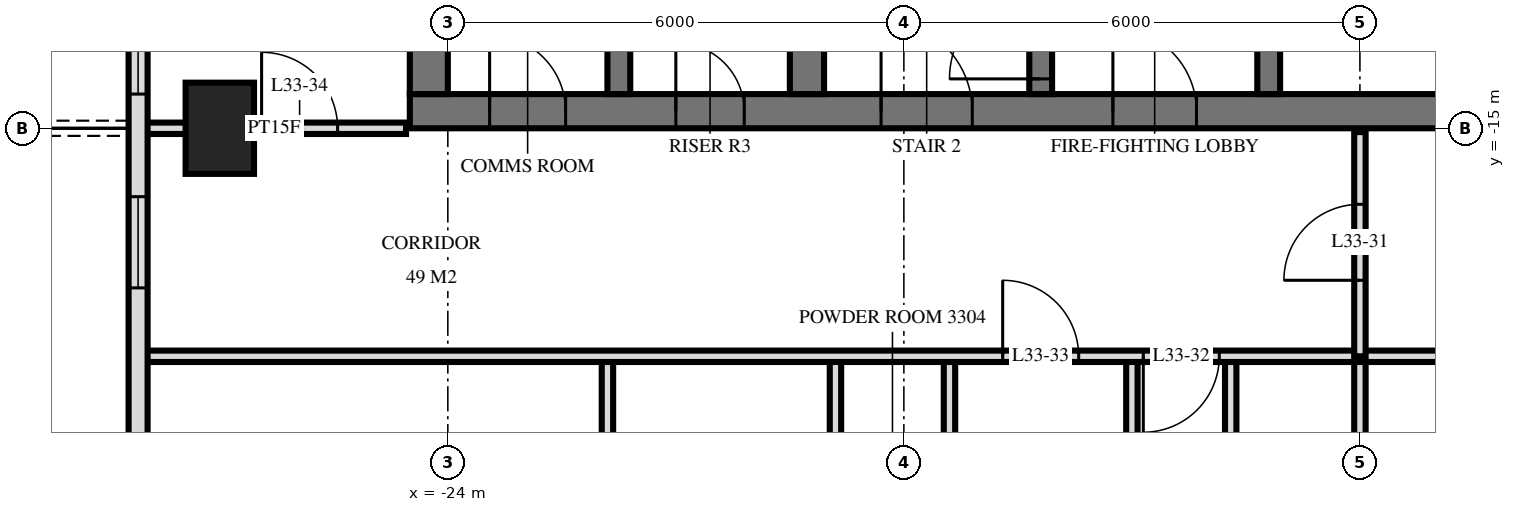
"""IFC4 building model, lengths in metres.
Left out: names, types, materials, properties, quantities, classifications, styles, units other than length and angle.
Written with IfcOpenShell. Run it as: python <this file> out.ifc"""

import sys

from ifc_helpers import new_model, si_unit, direction, frame, frame_2d, origin, origin_2d, place, context, subcontext, project, spatial, rectangle, extrude, element, fill, save


model = new_model("IFC4")
c1 = context("Model", 3, precision=1e-05, world=origin(), true_north=direction((0.0, 1.0)))
c2 = subcontext(c1, "Body", "Model", "MODEL_VIEW")
j1 = project(units=[si_unit("LENGTHUNIT", "METRE"), si_unit("PLANEANGLEUNIT", "RADIAN")], contexts=[c1])
p1 = place(None, origin())
s1 = spatial("IfcSite", under=j1, at=p1, CompositionType="ELEMENT")
p2 = place(p1, origin())
s2 = spatial("IfcBuilding", under=s1, at=p2, CompositionType="ELEMENT")
p3 = place(p2, frame((0.0, 0.0, 130.8)))
s3 = spatial("IfcBuildingStorey", under=s2, at=p3, CompositionType="ELEMENT", Elevation=130.8)
p4 = place(p3, frame((-27.0, -15.0, 0.0), z_axis=(0.0, 0.0, 1.0), x_axis=(0.0, 1.0, 0.0)))
e1 = element("IfcColumn", 1, at=p4, inside=s3, PredefinedType="COLUMN", context=c2, shape_type="SweptSolid", body=[
    extrude(rectangle(XDim=1.2, YDim=0.9, at=origin_2d()), origin(), (0.0, 0.0, 1.0), 3.6),
])
p5 = place(p3, frame((-24.5, -14.775, 0.0), z_axis=(0.0, 0.0, 1.0), x_axis=(1.0, 0.0, 0.0)))
e2 = element("IfcWall", 2, at=p5, inside=s3, PredefinedType="SHEAR", context=c2, shape_type="SweptSolid", body=[
    extrude(rectangle(XDim=14.5, YDim=0.45, at=frame_2d((7.25, 0.0))), origin(), (0.0, 0.0, 1.0), 3.6),
])
p6 = place(p5, frame((6.2, 0.0, 0.0)))
e3 = element("IfcOpeningElement", 3, at=p6, cuts=e2, PredefinedType="OPENING", context=c2, shape_type="SweptSolid", body=[
    extrude(rectangle(XDim=1.2, YDim=2.1, at=frame_2d((0.6, 1.05))), frame((0.0, 0.235, 0.0), z_axis=(0.0, -1.0, 0.0), x_axis=(1.0, 0.0, 0.0)), (0.0, 0.0, 1.0), 0.47),
])
p7 = place(p5, frame((9.25, 0.0, 0.0)))
e4 = element("IfcOpeningElement", 4, at=p7, cuts=e2, PredefinedType="OPENING", context=c2, shape_type="SweptSolid", body=[
    extrude(rectangle(XDim=1.1, YDim=2.1, at=frame_2d((0.55, 1.05))), frame((0.0, 0.235, 0.0), z_axis=(0.0, -1.0, 0.0), x_axis=(1.0, 0.0, 0.0)), (0.0, 0.0, 1.0), 0.47),
])
p8 = place(p5, frame((3.5, 0.0, 0.0)))
e5 = element("IfcOpeningElement", 5, at=p8, cuts=e2, PredefinedType="OPENING", context=c2, shape_type="SweptSolid", body=[
    extrude(rectangle(XDim=0.9, YDim=2.1, at=frame_2d((0.45, 1.05))), frame((0.0, 0.235, 0.0), z_axis=(0.0, -1.0, 0.0), x_axis=(1.0, 0.0, 0.0)), (0.0, 0.0, 1.0), 0.47),
])
p9 = place(p5, frame((1.05, 0.0, 0.0)))
e6 = element("IfcOpeningElement", 6, at=p9, cuts=e2, PredefinedType="OPENING", context=c2, shape_type="SweptSolid", body=[
    extrude(rectangle(XDim=1.0, YDim=2.1, at=frame_2d((0.5, 1.05))), frame((0.0, 0.235, 0.0), z_axis=(0.0, -1.0, 0.0), x_axis=(1.0, 0.0, 0.0)), (0.0, 0.0, 1.0), 0.47),
])
p10 = place(p3, frame((-24.25, -14.55, 0.0), z_axis=(0.0, 0.0, 1.0), x_axis=(0.0, 1.0, 0.0)))
e7 = element("IfcWall", 7, at=p10, inside=s3, PredefinedType="SHEAR", context=c2, shape_type="SweptSolid", body=[
    extrude(rectangle(XDim=14.1, YDim=0.5, at=frame_2d((7.05, 0.0))), origin(), (0.0, 0.0, 1.0), 3.6),
])
p11 = place(p3, frame((-13.2, -14.55, 0.0), z_axis=(0.0, 0.0, 1.0), x_axis=(0.0, 1.0, 0.0)))
e8 = element("IfcWall", 8, at=p11, inside=s3, PredefinedType="SHEAR", context=c2, shape_type="SweptSolid", body=[
    extrude(rectangle(XDim=5.4, YDim=0.3, at=frame_2d((2.7, 0.0))), origin(), (0.0, 0.0, 1.0), 3.6),
])
p12 = place(p11, frame((4.0, 0.0, 0.0)))
e9 = element("IfcOpeningElement", 9, at=p12, cuts=e8, PredefinedType="OPENING", context=c2, shape_type="SweptSolid", body=[
    extrude(rectangle(XDim=1.2, YDim=2.1, at=frame_2d((0.6, 1.05))), frame((0.0, 0.16, 0.0), z_axis=(0.0, -1.0, 0.0), x_axis=(1.0, 0.0, 0.0)), (0.0, 0.0, 1.0), 0.32),
])
p13 = place(p3, frame((-16.2, -14.55, 0.0), z_axis=(0.0, 0.0, 1.0), x_axis=(0.0, 1.0, 0.0)))
e10 = element("IfcWall", 10, at=p13, inside=s3, PredefinedType="SHEAR", context=c2, shape_type="SweptSolid", body=[
    extrude(rectangle(XDim=5.4, YDim=0.3, at=frame_2d((2.7, 0.0))), origin(), (0.0, 0.0, 1.0), 3.6),
])
p14 = place(p13, frame((0.2, 0.0, 0.0)))
e11 = element("IfcOpeningElement", 11, at=p14, cuts=e10, PredefinedType="OPENING", context=c2, shape_type="SweptSolid", body=[
    extrude(rectangle(XDim=1.2, YDim=2.1, at=frame_2d((0.6, 1.05))), frame((0.0, 0.16, 0.0), z_axis=(0.0, -1.0, 0.0), x_axis=(1.0, 0.0, 0.0)), (0.0, 0.0, 1.0), 0.32),
])
p15 = place(p3, frame((-19.275, -14.55, 0.0), z_axis=(0.0, 0.0, 1.0), x_axis=(0.0, 1.0, 0.0)))
e12 = element("IfcWall", 12, at=p15, inside=s3, PredefinedType="SHEAR", context=c2, shape_type="SweptSolid", body=[
    extrude(rectangle(XDim=5.4, YDim=0.45, at=frame_2d((2.7, 0.0))), origin(), (0.0, 0.0, 1.0), 3.6),
])
p16 = place(p3, frame((-21.75, -14.55, 0.0), z_axis=(0.0, 0.0, 1.0), x_axis=(0.0, 1.0, 0.0)))
e13 = element("IfcWall", 13, at=p16, inside=s3, PredefinedType="SHEAR", context=c2, shape_type="SweptSolid", body=[
    extrude(rectangle(XDim=5.4, YDim=0.3, at=frame_2d((2.7, 0.0))), origin(), (0.0, 0.0, 1.0), 3.6),
])
p17 = place(p3, frame((-28.075, -3.325, 0.0), z_axis=(0.0, 0.0, 1.0), x_axis=(0.0, -1.0, 0.0)))
e14 = element("IfcWall", 14, at=p17, inside=s3, PredefinedType="SOLIDWALL", context=c2, shape_type="SweptSolid", body=[
    extrude(rectangle(XDim=25.951, YDim=0.25, at=frame_2d((12.975, 0.0))), origin(), (0.0, 0.0, 1.0), 3.32),
])
p18 = place(p17, frame((6.575, 0.0, 0.0)))
e15 = element("IfcOpeningElement", 15, at=p18, cuts=e14, PredefinedType="OPENING", context=c2, shape_type="SweptSolid", body=[
    extrude(rectangle(XDim=1.8, YDim=2.4, at=frame_2d((0.9, 1.2))), frame((0.0, 0.135, 0.0), z_axis=(0.0, -1.0, 0.0), x_axis=(1.0, 0.0, 0.0)), (0.0, 0.0, 1.0), 0.27),
])
p19 = place(p17, frame((9.425, 0.0, 0.3)))
e16 = element("IfcOpeningElement", 16, at=p19, cuts=e14, PredefinedType="OPENING", context=c2, shape_type="SweptSolid", body=[
    extrude(rectangle(XDim=1.8, YDim=2.1, at=frame_2d((0.9, 1.05))), frame((0.0, 0.135, 0.0), z_axis=(0.0, -1.0, 0.0), x_axis=(1.0, 0.0, 0.0)), (0.0, 0.0, 1.0), 0.27),
])
p20 = place(p17, frame((12.575, 0.0, 0.3)))
e17 = element("IfcOpeningElement", 17, at=p20, cuts=e14, PredefinedType="OPENING", context=c2, shape_type="SweptSolid", body=[
    extrude(rectangle(XDim=1.2, YDim=2.1, at=frame_2d((0.6, 1.05))), frame((0.0, 0.135, 0.0), z_axis=(0.0, -1.0, 0.0), x_axis=(1.0, 0.0, 0.0)), (0.0, 0.0, 1.0), 0.27),
])
p21 = place(p17, frame((15.875, 0.0, 0.0)))
e18 = element("IfcOpeningElement", 18, at=p21, cuts=e14, PredefinedType="OPENING", context=c2, shape_type="SweptSolid", body=[
    extrude(rectangle(XDim=1.8, YDim=2.4, at=frame_2d((0.9, 1.2))), frame((0.0, 0.135, 0.0), z_axis=(0.0, -1.0, 0.0), x_axis=(1.0, 0.0, 0.0)), (0.0, 0.0, 1.0), 0.27),
])
p22 = place(p17, frame((21.075, 0.0, 0.0)))
e19 = element("IfcOpeningElement", 19, at=p22, cuts=e14, PredefinedType="OPENING", context=c2, shape_type="SweptSolid", body=[
    extrude(rectangle(XDim=1.8, YDim=2.4, at=frame_2d((0.9, 1.2))), frame((0.0, 0.135, 0.0), z_axis=(0.0, -1.0, 0.0), x_axis=(1.0, 0.0, 0.0)), (0.0, 0.0, 1.0), 0.27),
])
p23 = place(p17, frame((23.825, 0.0, 0.3)))
e20 = element("IfcOpeningElement", 20, at=p23, cuts=e14, PredefinedType="OPENING", context=c2, shape_type="SweptSolid", body=[
    extrude(rectangle(XDim=1.8, YDim=2.1, at=frame_2d((0.9, 1.05))), frame((0.0, 0.135, 0.0), z_axis=(0.0, -1.0, 0.0), x_axis=(1.0, 0.0, 0.0)), (0.0, 0.0, 1.0), 0.27),
])
p24 = place(p3, frame((-12.0, -18.0, 0.0), z_axis=(0.0, 0.0, 1.0), x_axis=(0.0, 1.0, 0.0)))
e21 = element("IfcWall", 21, at=p24, inside=s3, PredefinedType="PARTITIONING", context=c2, shape_type="SweptSolid", body=[
    extrude(rectangle(XDim=2.95, YDim=0.15, at=frame_2d((1.475, 0.0))), origin(), (0.0, 0.0, 1.0), 3.32),
])
p25 = place(p24, frame((1.0, 0.0, 0.0)))
e22 = element("IfcOpeningElement", 22, at=p25, cuts=e21, PredefinedType="OPENING", context=c2, shape_type="SweptSolid", body=[
    extrude(rectangle(XDim=1.0, YDim=2.1, at=frame_2d((0.5, 1.05))), frame((0.0, 0.085, 0.0), z_axis=(0.0, -1.0, 0.0), x_axis=(1.0, 0.0, 0.0)), (0.0, 0.0, 1.0), 0.17),
])
p26 = place(p3, frame((-12.0, -33.62, 0.0), z_axis=(0.0, 0.0, 1.0), x_axis=(0.0, 1.0, 0.0)))
e23 = element("IfcWall", 23, at=p26, inside=s3, PredefinedType="PARTITIONING", context=c2, shape_type="SweptSolid", body=[
    extrude(rectangle(XDim=15.62, YDim=0.15, at=frame_2d((7.81, 0.0))), origin(), (0.0, 0.0, 1.0), 3.32),
])
p27 = place(p3, frame((-13.7, -23.0, 0.0), z_axis=(0.0, 0.0, 1.0), x_axis=(0.0, 1.0, 0.0)))
e24 = element("IfcWall", 24, at=p27, inside=s3, PredefinedType="PARTITIONING", context=c2, shape_type="SweptSolid", body=[
    extrude(rectangle(XDim=5.0, YDim=0.15, at=frame_2d((2.5, 0.0))), origin(), (0.0, 0.0, 1.0), 3.32),
])
p28 = place(p27, frame((2.12, 0.0, 0.0)))
e25 = element("IfcOpeningElement", 25, at=p28, cuts=e24, PredefinedType="OPENING", context=c2, shape_type="SweptSolid", body=[
    extrude(rectangle(XDim=0.8, YDim=2.1, at=frame_2d((0.4, 1.05))), frame((0.0, 0.085, 0.0), z_axis=(0.0, -1.0, 0.0), x_axis=(1.0, 0.0, 0.0)), (0.0, 0.0, 1.0), 0.17),
])
p29 = place(p3, frame((-15.0, -22.2, 0.0), z_axis=(0.0, 0.0, 1.0), x_axis=(0.0, 1.0, 0.0)))
e26 = element("IfcWall", 26, at=p29, inside=s3, PredefinedType="PARTITIONING", context=c2, shape_type="SweptSolid", body=[
    extrude(rectangle(XDim=4.2, YDim=0.15, at=frame_2d((2.1, 0.0))), origin(), (0.0, 0.0, 1.0), 3.32),
])
p30 = place(p3, frame((-17.4, -22.2, 0.0), z_axis=(0.0, 0.0, 1.0), x_axis=(0.0, 1.0, 0.0)))
e27 = element("IfcWall", 27, at=p30, inside=s3, PredefinedType="PARTITIONING", context=c2, shape_type="SweptSolid", body=[
    extrude(rectangle(XDim=4.2, YDim=0.15, at=frame_2d((2.1, 0.0))), origin(), (0.0, 0.0, 1.0), 3.32),
])
p31 = place(p30, frame((1.58, 0.0, 0.0)))
e28 = element("IfcOpeningElement", 28, at=p31, cuts=e27, PredefinedType="OPENING", context=c2, shape_type="SweptSolid", body=[
    extrude(rectangle(XDim=1.0, YDim=2.1, at=frame_2d((0.5, 1.05))), frame((0.0, 0.085, 0.0), z_axis=(0.0, -1.0, 0.0), x_axis=(1.0, 0.0, 0.0)), (0.0, 0.0, 1.0), 0.17),
])
p32 = place(p3, frame((-18.9, -22.2, 0.0), z_axis=(0.0, 0.0, 1.0), x_axis=(0.0, 1.0, 0.0)))
e29 = element("IfcWall", 29, at=p32, inside=s3, PredefinedType="PLUMBINGWALL", context=c2, shape_type="SweptSolid", body=[
    extrude(rectangle(XDim=4.2, YDim=0.15, at=frame_2d((2.1, 0.0))), origin(), (0.0, 0.0, 1.0), 3.32),
])
p33 = place(p3, frame((-21.9, -22.2, 0.0), z_axis=(0.0, 0.0, 1.0), x_axis=(0.0, 1.0, 0.0)))
e30 = element("IfcWall", 30, at=p33, inside=s3, PredefinedType="PARTITIONING", context=c2, shape_type="SweptSolid", body=[
    extrude(rectangle(XDim=4.2, YDim=0.15, at=frame_2d((2.1, 0.0))), origin(), (0.0, 0.0, 1.0), 3.32),
])
p34 = place(p3, frame((-28.02, -18.0, 0.0), z_axis=(0.0, 0.0, 1.0), x_axis=(1.0, 0.0, 0.0)))
e31 = element("IfcWall", 31, at=p34, inside=s3, PredefinedType="PARTITIONING", context=c2, shape_type="SweptSolid", body=[
    extrude(rectangle(XDim=56.04, YDim=0.15, at=frame_2d((28.02, 0.0))), origin(), (0.0, 0.0, 1.0), 3.32),
])
p35 = place(p34, frame((13.17, 0.0, 0.0)))
e32 = element("IfcOpeningElement", 32, at=p35, cuts=e31, PredefinedType="OPENING", context=c2, shape_type="SweptSolid", body=[
    extrude(rectangle(XDim=1.0, YDim=2.1, at=frame_2d((0.5, 1.05))), frame((0.0, 0.085, 0.0), z_axis=(0.0, -1.0, 0.0), x_axis=(1.0, 0.0, 0.0)), (0.0, 0.0, 1.0), 0.17),
])
p36 = place(p34, frame((11.32, 0.0, 0.0)))
e33 = element("IfcOpeningElement", 33, at=p36, cuts=e31, PredefinedType="OPENING", context=c2, shape_type="SweptSolid", body=[
    extrude(rectangle(XDim=1.0, YDim=2.1, at=frame_2d((0.5, 1.05))), frame((0.0, 0.085, 0.0), z_axis=(0.0, -1.0, 0.0), x_axis=(1.0, 0.0, 0.0)), (0.0, 0.0, 1.0), 0.17),
])
p37 = place(p34, frame((41.87, 0.0, 0.0)))
e34 = element("IfcOpeningElement", 34, at=p37, cuts=e31, PredefinedType="OPENING", context=c2, shape_type="SweptSolid", body=[
    extrude(rectangle(XDim=1.0, YDim=2.1, at=frame_2d((0.5, 1.05))), frame((0.0, 0.085, 0.0), z_axis=(0.0, -1.0, 0.0), x_axis=(1.0, 0.0, 0.0)), (0.0, 0.0, 1.0), 0.17),
])
p38 = place(p34, frame((43.17, 0.0, 0.0)))
e35 = element("IfcOpeningElement", 35, at=p38, cuts=e31, PredefinedType="OPENING", context=c2, shape_type="SweptSolid", body=[
    extrude(rectangle(XDim=1.0, YDim=2.1, at=frame_2d((0.5, 1.05))), frame((0.0, 0.085, 0.0), z_axis=(0.0, -1.0, 0.0), x_axis=(1.0, 0.0, 0.0)), (0.0, 0.0, 1.0), 0.17),
])
p39 = place(p34, frame((46.72, 0.0, 0.0)))
e36 = element("IfcOpeningElement", 36, at=p39, cuts=e31, PredefinedType="OPENING", context=c2, shape_type="SweptSolid", body=[
    extrude(rectangle(XDim=1.0, YDim=2.1, at=frame_2d((0.5, 1.05))), frame((0.0, 0.085, 0.0), z_axis=(0.0, -1.0, 0.0), x_axis=(1.0, 0.0, 0.0)), (0.0, 0.0, 1.0), 0.17),
])
p40 = place(p34, frame((21.52, 0.0, 0.0)))
e37 = element("IfcOpeningElement", 37, at=p40, cuts=e31, PredefinedType="OPENING", context=c2, shape_type="SweptSolid", body=[
    extrude(rectangle(XDim=1.0, YDim=2.1, at=frame_2d((0.5, 1.05))), frame((0.0, 0.085, 0.0), z_axis=(0.0, -1.0, 0.0), x_axis=(1.0, 0.0, 0.0)), (0.0, 0.0, 1.0), 0.17),
])
p41 = place(p34, frame((33.52, 0.0, 0.0)))
e38 = element("IfcOpeningElement", 38, at=p41, cuts=e31, PredefinedType="OPENING", context=c2, shape_type="SweptSolid", body=[
    extrude(rectangle(XDim=1.0, YDim=2.1, at=frame_2d((0.5, 1.05))), frame((0.0, 0.085, 0.0), z_axis=(0.0, -1.0, 0.0), x_axis=(1.0, 0.0, 0.0)), (0.0, 0.0, 1.0), 0.17),
])
p42 = place(p3, frame((-28.02, -15.0, 0.0), z_axis=(0.0, 0.0, 1.0), x_axis=(1.0, 0.0, 0.0)))
e39 = element("IfcWall", 39, at=p42, inside=s3, PredefinedType="PARTITIONING", context=c2, shape_type="SweptSolid", body=[
    extrude(rectangle(XDim=3.47, YDim=0.15, at=frame_2d((1.735, 0.0))), origin(), (0.0, 0.0, 1.0), 3.32),
])
p43 = place(p42, frame((1.57, 0.0, 0.0)))
e40 = element("IfcOpeningElement", 40, at=p43, cuts=e39, PredefinedType="OPENING", context=c2, shape_type="SweptSolid", body=[
    extrude(rectangle(XDim=1.0, YDim=2.1, at=frame_2d((0.5, 1.05))), frame((0.0, 0.085, 0.0), z_axis=(0.0, -1.0, 0.0), x_axis=(1.0, 0.0, 0.0)), (0.0, 0.0, 1.0), 0.17),
])
p44 = place(p19, origin())
e41 = element("IfcWindow", 41, at=p44, inside=s3, PartitioningType="SINGLE_PANEL", PredefinedType="WINDOW", context=c2, shape_type="SweptSolid", body=[
    extrude(rectangle(XDim=1.8, YDim=2.1, at=frame_2d((0.9, 1.05))), frame((0.0, 0.03, 0.0), z_axis=(0.0, -1.0, 0.0), x_axis=(1.0, 0.0, 0.0)), (0.0, 0.0, 1.0), 0.06),
])
fill(e16, e41)
p45 = place(p20, origin())
e42 = element("IfcWindow", 42, at=p45, inside=s3, PartitioningType="SINGLE_PANEL", PredefinedType="WINDOW", context=c2, shape_type="SweptSolid", body=[
    extrude(rectangle(XDim=1.2, YDim=2.1, at=frame_2d((0.6, 1.05))), frame((0.0, 0.03, 0.0), z_axis=(0.0, -1.0, 0.0), x_axis=(1.0, 0.0, 0.0)), (0.0, 0.0, 1.0), 0.06),
])
fill(e17, e42)
p46 = place(p6, origin())
e43 = element("IfcDoor", 43, at=p46, inside=s3, OperationType="SINGLE_SWING_RIGHT", PredefinedType="DOOR", context=c2, shape_type="SweptSolid", body=[
    extrude(rectangle(XDim=1.2, YDim=2.1, at=frame_2d((0.6, 1.05))), frame((0.0, 0.025, 0.0), z_axis=(0.0, -1.0, 0.0), x_axis=(1.0, 0.0, 0.0)), (0.0, 0.0, 1.0), 0.05),
])
fill(e3, e43)
p47 = place(p7, origin())
e44 = element("IfcDoor", 44, at=p47, inside=s3, OperationType="SINGLE_SWING_RIGHT", PredefinedType="DOOR", context=c2, shape_type="SweptSolid", body=[
    extrude(rectangle(XDim=1.1, YDim=2.1, at=frame_2d((0.55, 1.05))), frame((0.0, 0.025, 0.0), z_axis=(0.0, -1.0, 0.0), x_axis=(1.0, 0.0, 0.0)), (0.0, 0.0, 1.0), 0.05),
])
fill(e4, e44)
p48 = place(p8, origin())
e45 = element("IfcDoor", 45, at=p48, inside=s3, OperationType="SINGLE_SWING_RIGHT", PredefinedType="DOOR", context=c2, shape_type="SweptSolid", body=[
    extrude(rectangle(XDim=0.9, YDim=2.1, at=frame_2d((0.45, 1.05))), frame((0.0, 0.025, 0.0), z_axis=(0.0, -1.0, 0.0), x_axis=(1.0, 0.0, 0.0)), (0.0, 0.0, 1.0), 0.05),
])
fill(e5, e45)
p49 = place(p9, origin())
e46 = element("IfcDoor", 46, at=p49, inside=s3, OperationType="SINGLE_SWING_RIGHT", PredefinedType="DOOR", context=c2, shape_type="SweptSolid", body=[
    extrude(rectangle(XDim=1.0, YDim=2.1, at=frame_2d((0.5, 1.05))), frame((0.0, 0.025, 0.0), z_axis=(0.0, -1.0, 0.0), x_axis=(1.0, 0.0, 0.0)), (0.0, 0.0, 1.0), 0.05),
])
fill(e6, e46)
p50 = place(p14, origin())
e47 = element("IfcDoor", 47, at=p50, inside=s3, OperationType="SINGLE_SWING_RIGHT", PredefinedType="DOOR", context=c2, shape_type="SweptSolid", body=[
    extrude(rectangle(XDim=1.2, YDim=2.1, at=frame_2d((0.6, 1.05))), frame((0.0, 0.025, 0.0), z_axis=(0.0, -1.0, 0.0), x_axis=(1.0, 0.0, 0.0)), (0.0, 0.0, 1.0), 0.05),
])
fill(e11, e47)
p51 = place(p25, origin())
e48 = element("IfcDoor", 48, at=p51, inside=s3, OperationType="SINGLE_SWING_RIGHT", PredefinedType="DOOR", context=c2, shape_type="SweptSolid", body=[
    extrude(rectangle(XDim=1.0, YDim=2.1, at=frame_2d((0.5, 1.05))), frame((0.0, 0.025, 0.0), z_axis=(0.0, -1.0, 0.0), x_axis=(1.0, 0.0, 0.0)), (0.0, 0.0, 1.0), 0.05),
])
fill(e22, e48)
p52 = place(p35, frame((0.5, 0.0, 0.0), z_axis=(0.0, 0.0, 1.0), x_axis=(-1.0, 0.0, 0.0)))
e49 = element("IfcDoor", 49, at=p52, inside=s3, OperationType="SINGLE_SWING_LEFT", PredefinedType="DOOR", context=c2, shape_type="SweptSolid", body=[
    extrude(rectangle(XDim=1.0, YDim=2.1, at=frame_2d((0.0, 1.05))), frame((0.0, -0.025, 0.0), z_axis=(0.0, 1.0, 0.0), x_axis=(-1.0, 0.0, 0.0)), (0.0, 0.0, 1.0), 0.05),
])
fill(e32, e49)
p53 = place(p36, origin())
e50 = element("IfcDoor", 50, at=p53, inside=s3, OperationType="SINGLE_SWING_RIGHT", PredefinedType="DOOR", context=c2, shape_type="SweptSolid", body=[
    extrude(rectangle(XDim=1.0, YDim=2.1, at=frame_2d((0.5, 1.05))), frame((0.0, 0.025, 0.0), z_axis=(0.0, -1.0, 0.0), x_axis=(1.0, 0.0, 0.0)), (0.0, 0.0, 1.0), 0.05),
])
fill(e33, e50)
p54 = place(p43, origin())
e51 = element("IfcDoor", 51, at=p54, inside=s3, OperationType="SINGLE_SWING_RIGHT", PredefinedType="DOOR", context=c2, shape_type="SweptSolid", body=[
    extrude(rectangle(XDim=1.0, YDim=2.1, at=frame_2d((0.5, 1.05))), frame((0.0, 0.025, 0.0), z_axis=(0.0, -1.0, 0.0), x_axis=(1.0, 0.0, 0.0)), (0.0, 0.0, 1.0), 0.05),
])
fill(e40, e51)
save(model, sys.argv[1])
